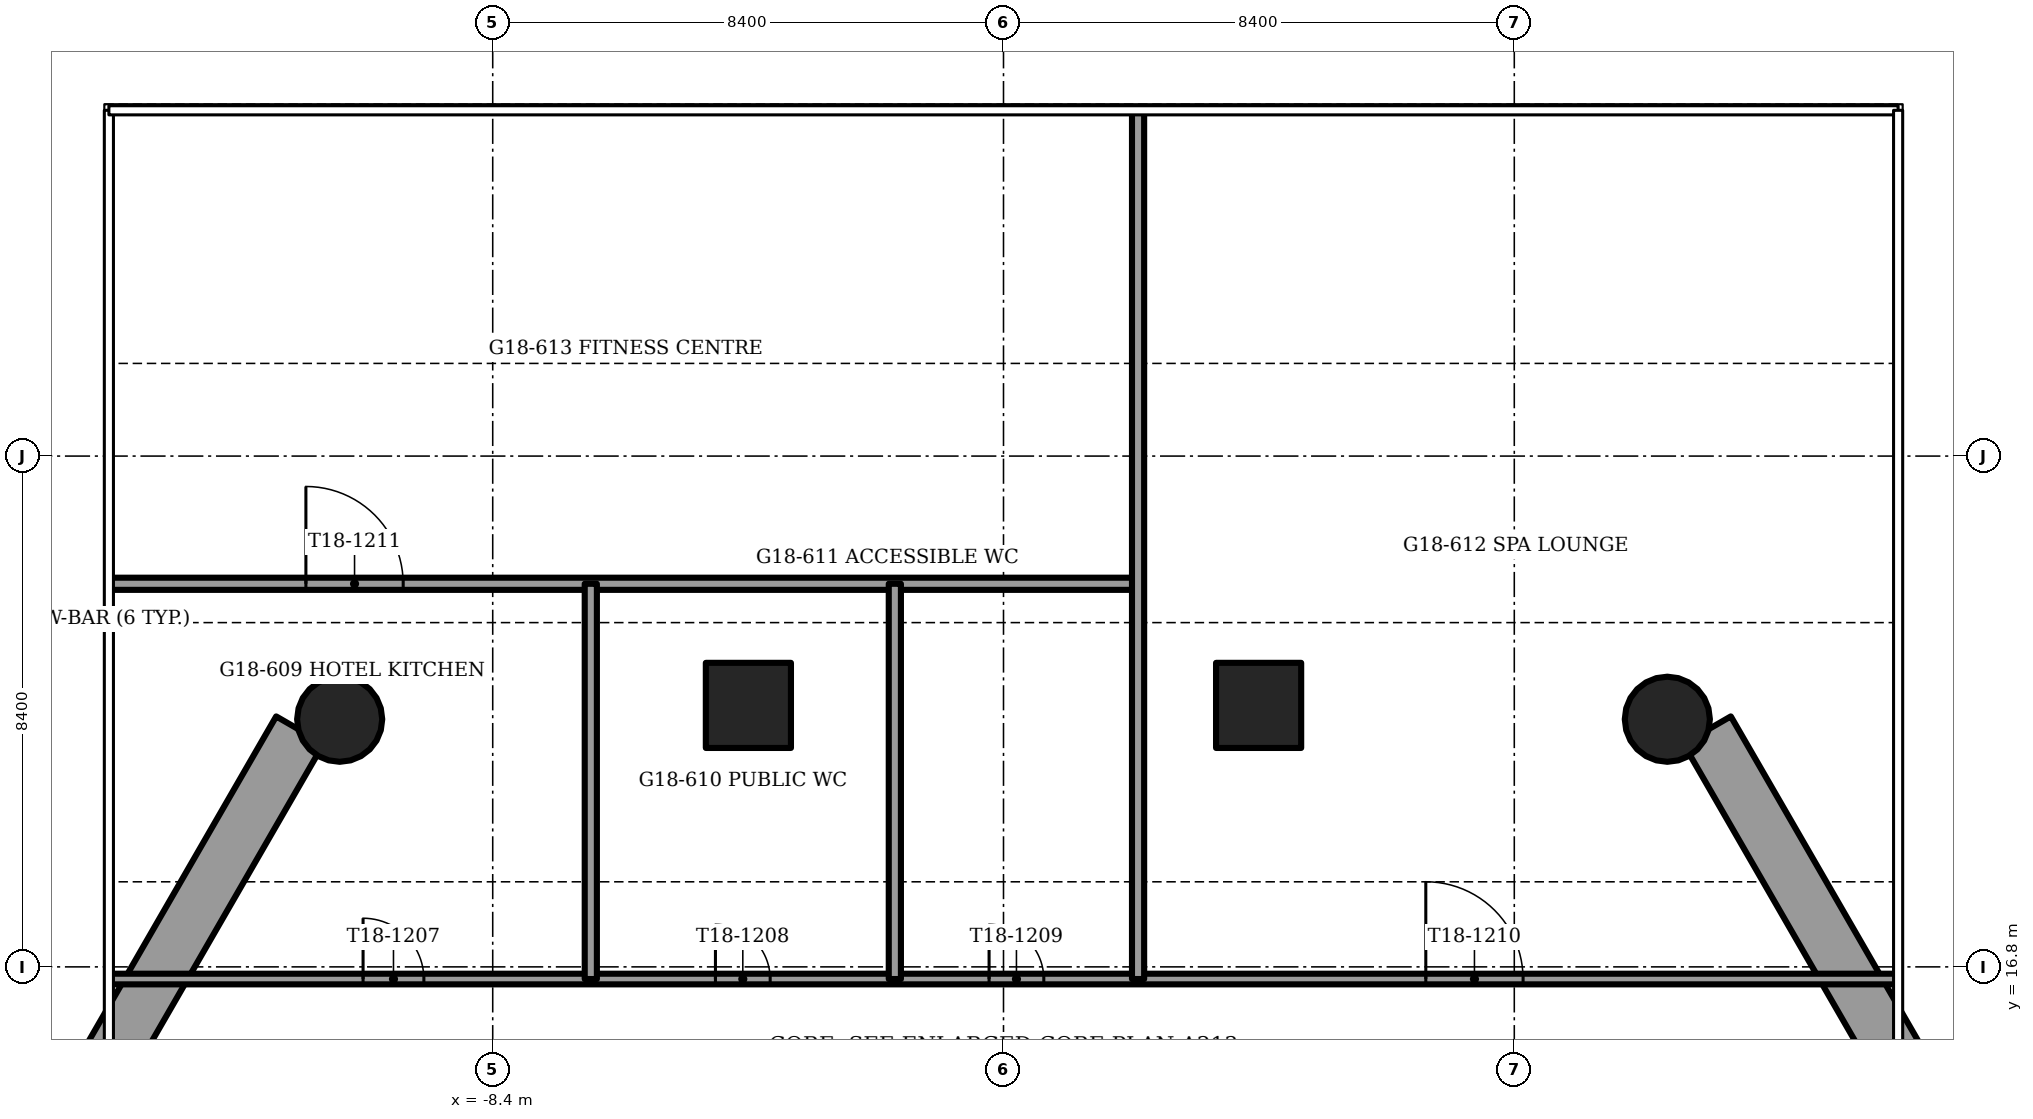
"""IFC4 building model, lengths in metres.
Left out: names, types, materials, properties, quantities, classifications, styles, units other than length and angle.
Written with IfcOpenShell. Run it as: python <this file> out.ifc"""

import sys

from ifc_helpers import new_model, si_unit, direction, frame, frame_2d, origin, origin_2d, place, context, subcontext, project, spatial, rectangle, circle, extrude, element, fill, save


model = new_model("IFC4")
c1 = context("Model", 3, precision=1e-05, world=origin(), true_north=direction((0.0, 1.0)))
c2 = subcontext(c1, "Body", "Model", "MODEL_VIEW")
j1 = project(units=[si_unit("LENGTHUNIT", "METRE"), si_unit("PLANEANGLEUNIT", "RADIAN")], contexts=[c1])
p1 = place(None, origin())
s1 = spatial("IfcSite", under=j1, at=p1, CompositionType="ELEMENT")
p2 = place(p1, origin())
s2 = spatial("IfcBuilding", under=s1, at=p2, CompositionType="ELEMENT")
p3 = place(p2, frame((0.0, 0.0, 73.0)))
s3 = spatial("IfcBuildingStorey", under=s2, at=p3, CompositionType="ELEMENT", Elevation=73.0)
for number, where, z_axis, x_axis in (
    (1, (-10.917, 20.872, -1.2), (0.0, 0.0, 1.0), (1.0, 0.0, 0.0)),
    (2, (10.917, 20.872, -1.2), (0.0, 0.0, 1.0), (1.0, 0.0, 0.0)),
):
    element("IfcColumn", number, at=place(p3, frame(where, z_axis=z_axis, x_axis=x_axis)), inside=s3, PredefinedType="COLUMN", context=c2, shape_type="SweptSolid", body=[
        extrude(circle(Radius=0.7, at=origin_2d()), origin(), (0.0, 0.0, 1.0), 3.75),
    ])
for number, where, z_axis, x_axis in (
    (3, (4.195, 21.1, -1.2), (0.0, 0.0, 1.0), (1.0, 0.0, 0.0)),
    (4, (-4.195, 21.1, -1.2), (0.0, 0.0, 1.0), (1.0, 0.0, 0.0)),
):
    element("IfcColumn", number, at=place(p3, frame(where, z_axis=z_axis, x_axis=x_axis)), inside=s3, PredefinedType="COLUMN", context=c2, shape_type="SweptSolid", body=[
        extrude(rectangle(XDim=1.4, YDim=1.4, at=origin_2d()), origin(), (0.0, 0.0, 1.0), 3.75),
    ])
for number, where, z_axis, x_axis in (
    (5, (-11.571, 20.694, 0.0), (0.0, 0.0, 1.0), (-0.5, -0.866, 0.0)),
    (6, (15.207, 14.398, 0.0), (0.0, 0.0, 1.0), (-0.5, 0.866, 0.0)),
):
    element("IfcWall", number, at=place(p3, frame(where, z_axis=z_axis, x_axis=x_axis)), inside=s3, PredefinedType="PARAPET", context=c2, shape_type="SweptSolid", body=[
        extrude(rectangle(XDim=7.271, YDim=0.9, at=frame_2d((3.635, 0.0))), origin(), (0.0, 0.0, 1.0), 1.1),
    ])
p4 = place(p3, frame((-14.693, 16.6, 0.0), z_axis=(0.0, 0.0, 1.0), x_axis=(1.0, 0.0, 0.0)))
e7 = element("IfcWall", 7, at=p4, inside=s3, PredefinedType="PARTITIONING", context=c2, shape_type="SweptSolid", body=[
    extrude(rectangle(XDim=29.386, YDim=0.175, at=frame_2d((14.693, 0.0))), origin(), (0.0, 0.0, 1.0), 2.25),
])
p5 = place(p4, frame((4.161, 0.0, 0.0)))
e8 = element("IfcOpeningElement", 8, at=p5, cuts=e7, PredefinedType="OPENING", context=c2, shape_type="SweptSolid", body=[
    extrude(rectangle(XDim=1.0, YDim=2.1, at=frame_2d((0.5, 1.05))), frame((0.0, 0.087, 0.0), z_axis=(0.0, -1.0, 0.0), x_axis=(1.0, 0.0, 0.0)), (0.0, 0.0, 1.0), 0.175),
])
p6 = place(p4, frame((9.956, 0.0, 0.0)))
e9 = element("IfcOpeningElement", 9, at=p6, cuts=e7, PredefinedType="OPENING", context=c2, shape_type="SweptSolid", body=[
    extrude(rectangle(XDim=0.9, YDim=2.1, at=frame_2d((0.45, 1.05))), frame((0.0, 0.087, 0.0), z_axis=(0.0, -1.0, 0.0), x_axis=(1.0, 0.0, 0.0)), (0.0, 0.0, 1.0), 0.175),
])
p7 = place(p4, frame((14.456, 0.0, 0.0)))
e10 = element("IfcOpeningElement", 10, at=p7, cuts=e7, PredefinedType="OPENING", context=c2, shape_type="SweptSolid", body=[
    extrude(rectangle(XDim=0.9, YDim=2.1, at=frame_2d((0.45, 1.05))), frame((0.0, 0.087, 0.0), z_axis=(0.0, -1.0, 0.0), x_axis=(1.0, 0.0, 0.0)), (0.0, 0.0, 1.0), 0.175),
])
p8 = place(p4, frame((21.638, 0.0, 0.0)))
e11 = element("IfcOpeningElement", 11, at=p8, cuts=e7, PredefinedType="OPENING", context=c2, shape_type="SweptSolid", body=[
    extrude(rectangle(XDim=1.6, YDim=2.1, at=frame_2d((0.8, 1.05))), frame((0.0, 0.087, 0.0), z_axis=(0.0, -1.0, 0.0), x_axis=(1.0, 0.0, 0.0)), (0.0, 0.0, 1.0), 0.175),
])
p9 = place(p3, frame((-14.693, 23.1, 0.0), z_axis=(0.0, 0.0, 1.0), x_axis=(1.0, 0.0, 0.0)))
e12 = element("IfcWall", 12, at=p9, inside=s3, PredefinedType="PARTITIONING", context=c2, shape_type="SweptSolid", body=[
    extrude(rectangle(XDim=16.906, YDim=0.2, at=frame_2d((8.453, 0.0))), origin(), (0.0, 0.0, 1.0), 3.45),
])
p10 = place(p9, frame((3.221, 0.0, 0.0)))
e13 = element("IfcOpeningElement", 13, at=p10, cuts=e12, PredefinedType="OPENING", context=c2, shape_type="SweptSolid", body=[
    extrude(rectangle(XDim=1.6, YDim=2.1, at=frame_2d((0.8, 1.05))), frame((0.0, 0.1, 0.0), z_axis=(0.0, -1.0, 0.0), x_axis=(1.0, 0.0, 0.0)), (0.0, 0.0, 1.0), 0.2),
])
for number, where, z_axis, x_axis in (
    (14, (-6.787, 16.6, 0.0), (0.0, 0.0, 1.0), (0.0, 1.0, 0.0)),
    (15, (-1.787, 16.6, 0.0), (0.0, 0.0, 1.0), (0.0, 1.0, 0.0)),
):
    element("IfcWall", number, at=place(p3, frame(where, z_axis=z_axis, x_axis=x_axis)), inside=s3, PredefinedType="PARTITIONING", context=c2, shape_type="SweptSolid", body=[
        extrude(rectangle(XDim=6.5, YDim=0.2, at=frame_2d((3.25, 0.0))), origin(), (0.0, 0.0, 1.0), 2.828),
    ])
p11 = place(p3, frame((2.213, 16.6, 0.0), z_axis=(0.0, 0.0, 1.0), x_axis=(0.0, 1.0, 0.0)))
e16 = element("IfcWall", 16, at=p11, inside=s3, PredefinedType="PARTITIONING", context=c2, shape_type="SweptSolid", body=[
    extrude(rectangle(XDim=14.267, YDim=0.2, at=frame_2d((7.134, 0.0))), origin(), (0.0, 0.0, 1.0), 2.828),
])
p12 = place(p5, origin())
e17 = element("IfcDoor", 17, at=p12, inside=s3, OperationType="SINGLE_SWING_LEFT", PredefinedType="DOOR", context=c2, shape_type="SweptSolid", body=[
    extrude(rectangle(XDim=1.0, YDim=2.1, at=frame_2d((0.5, 1.05))), frame((0.0, 0.025, 0.0), z_axis=(0.0, -1.0, 0.0), x_axis=(1.0, 0.0, 0.0)), (0.0, 0.0, 1.0), 0.05),
])
fill(e8, e17)
p13 = place(p6, origin())
e18 = element("IfcDoor", 18, at=p13, inside=s3, OperationType="SINGLE_SWING_RIGHT", PredefinedType="DOOR", context=c2, shape_type="SweptSolid", body=[
    extrude(rectangle(XDim=0.9, YDim=2.1, at=frame_2d((0.45, 1.05))), frame((0.0, 0.025, 0.0), z_axis=(0.0, -1.0, 0.0), x_axis=(1.0, 0.0, 0.0)), (0.0, 0.0, 1.0), 0.05),
])
fill(e9, e18)
p14 = place(p7, origin())
e19 = element("IfcDoor", 19, at=p14, inside=s3, OperationType="SINGLE_SWING_LEFT", PredefinedType="DOOR", context=c2, shape_type="SweptSolid", body=[
    extrude(rectangle(XDim=0.9, YDim=2.1, at=frame_2d((0.45, 1.05))), frame((0.0, 0.025, 0.0), z_axis=(0.0, -1.0, 0.0), x_axis=(1.0, 0.0, 0.0)), (0.0, 0.0, 1.0), 0.05),
])
fill(e10, e19)
p15 = place(p8, origin())
e20 = element("IfcDoor", 20, at=p15, inside=s3, OperationType="DOUBLE_DOOR_SINGLE_SWING", PredefinedType="DOOR", context=c2, shape_type="SweptSolid", body=[
    extrude(rectangle(XDim=1.6, YDim=2.1, at=frame_2d((0.8, 1.05))), frame((0.0, 0.025, 0.0), z_axis=(0.0, -1.0, 0.0), x_axis=(1.0, 0.0, 0.0)), (0.0, 0.0, 1.0), 0.05),
])
fill(e11, e20)
p16 = place(p10, origin())
e21 = element("IfcDoor", 21, at=p16, inside=s3, OperationType="DOUBLE_DOOR_SINGLE_SWING", PredefinedType="DOOR", context=c2, shape_type="SweptSolid", body=[
    extrude(rectangle(XDim=1.6, YDim=2.1, at=frame_2d((0.8, 1.05))), frame((0.0, 0.025, 0.0), z_axis=(0.0, -1.0, 0.0), x_axis=(1.0, 0.0, 0.0)), (0.0, 0.0, 1.0), 0.05),
])
fill(e13, e21)
save(model, sys.argv[1])
